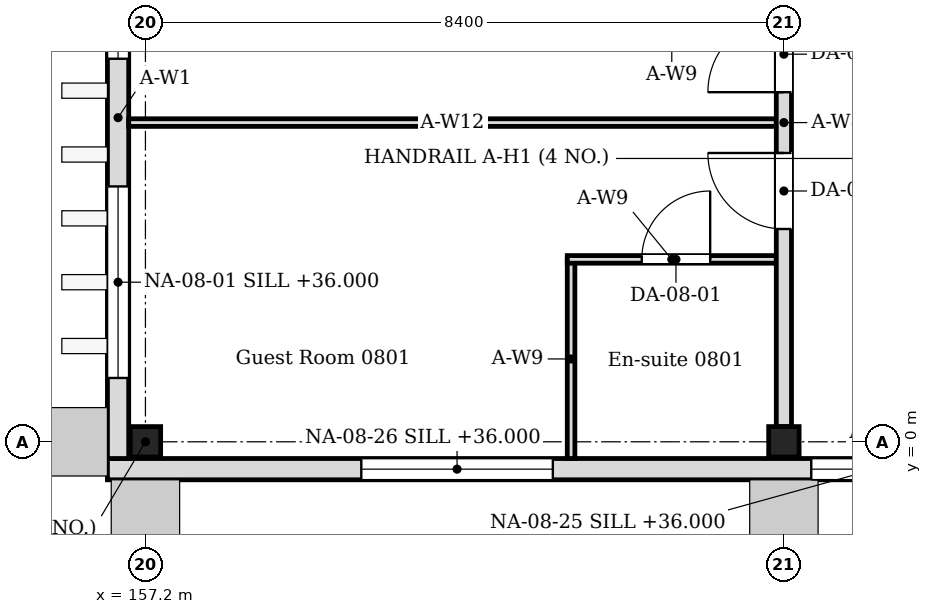
"""IFC4 building model, lengths in metres.
Left out: names, types, materials, properties, quantities, classifications, styles, units other than length and angle.
Written with IfcOpenShell. Run it as: python <this file> out.ifc"""

import sys

from ifc_helpers import new_model, si_unit, direction, frame, frame_2d, origin, origin_2d, place, context, subcontext, project, spatial, rectangle, i_section, extrude, element, fill, save


model = new_model("IFC4")
c1 = context("Model", 3, precision=1e-05, world=origin(), true_north=direction((0.0, 1.0)))
c2 = subcontext(c1, "Body", "Model", "MODEL_VIEW")
j1 = project(units=[si_unit("LENGTHUNIT", "METRE"), si_unit("PLANEANGLEUNIT", "RADIAN")], contexts=[c1])
p1 = place(None, origin())
s1 = spatial("IfcSite", under=j1, at=p1, CompositionType="ELEMENT")
p2 = place(p1, origin())
s2 = spatial("IfcBuilding", under=s1, at=p2, CompositionType="ELEMENT")
p3 = place(p2, frame((0.0, 0.0, 35.4)))
s3 = spatial("IfcBuildingStorey", under=s2, at=p3, CompositionType="ELEMENT", Elevation=35.4)
for number, where, z_axis, x_axis in (
    (1, (157.2, 0.0, 0.0), (0.0, 0.0, 1.0), (1.0, 0.0, 0.0)),
    (2, (165.6, 0.0, 0.0), (0.0, 0.0, 1.0), (1.0, 0.0, 0.0)),
):
    element("IfcColumn", number, at=place(p3, frame(where, z_axis=z_axis, x_axis=x_axis)), inside=s3, PredefinedType="COLUMN", context=c2, shape_type="SweptSolid", body=[
        extrude(i_section(OverallWidth=0.4, OverallDepth=0.4, WebThickness=0.013, FlangeThickness=0.021, FilletRadius=0.022, at=origin_2d()), origin(), (0.0, 0.0, 1.0), 4.2),
    ])
p4 = place(p3, frame((156.84, -0.22, 0.0), z_axis=(0.0, 0.0, 1.0), x_axis=(0.0, 1.0, 0.0)))
e3 = element("IfcWall", 3, at=p4, inside=s3, PredefinedType="SOLIDWALL", context=c2, shape_type="SweptSolid", body=[
    extrude(rectangle(XDim=8.97, YDim=0.28, at=frame_2d((4.485, 0.0))), origin(), (0.0, 0.0, 1.0), 4.05),
])
p5 = place(p4, frame((1.06, 0.0, 0.6)))
e4 = element("IfcOpeningElement", 4, at=p5, cuts=e3, PredefinedType="OPENING", context=c2, shape_type="SweptSolid", body=[
    extrude(rectangle(XDim=2.52, YDim=2.4, at=frame_2d((1.26, 1.2))), frame((0.0, 0.15, 0.0), z_axis=(0.0, -1.0, 0.0), x_axis=(1.0, 0.0, 0.0)), (0.0, 0.0, 1.0), 0.3),
])
p6 = place(p4, frame((5.26, 0.0, 0.6)))
e5 = element("IfcOpeningElement", 5, at=p6, cuts=e3, PredefinedType="OPENING", context=c2, shape_type="SweptSolid", body=[
    extrude(rectangle(XDim=2.52, YDim=2.4, at=frame_2d((1.26, 1.2))), frame((0.0, 0.15, 0.0), z_axis=(0.0, -1.0, 0.0), x_axis=(1.0, 0.0, 0.0)), (0.0, 0.0, 1.0), 0.3),
])
p7 = place(p3, frame((156.7, -0.36, 0.0), z_axis=(0.0, 0.0, 1.0), x_axis=(1.0, 0.0, 0.0)))
e6 = element("IfcWall", 6, at=p7, inside=s3, PredefinedType="SOLIDWALL", context=c2, shape_type="SweptSolid", body=[
    extrude(rectangle(XDim=20.2, YDim=0.28, at=frame_2d((10.1, 0.0))), origin(), (0.0, 0.0, 1.0), 4.05),
])
p8 = place(p7, frame((9.26, 0.0, 0.6)))
e7 = element("IfcOpeningElement", 7, at=p8, cuts=e6, PredefinedType="OPENING", context=c2, shape_type="SweptSolid", body=[
    extrude(rectangle(XDim=1.68, YDim=2.4, at=frame_2d((0.84, 1.2))), frame((0.0, 0.15, 0.0), z_axis=(0.0, -1.0, 0.0), x_axis=(1.0, 0.0, 0.0)), (0.0, 0.0, 1.0), 0.3),
])
p9 = place(p7, frame((3.34, 0.0, 0.6)))
e8 = element("IfcOpeningElement", 8, at=p9, cuts=e6, PredefinedType="OPENING", context=c2, shape_type="SweptSolid", body=[
    extrude(rectangle(XDim=2.52, YDim=2.4, at=frame_2d((1.26, 1.2))), frame((0.0, 0.15, 0.0), z_axis=(0.0, -1.0, 0.0), x_axis=(1.0, 0.0, 0.0)), (0.0, 0.0, 1.0), 0.3),
])
p10 = place(p3, frame((162.8, -0.22, 0.0), z_axis=(0.0, 0.0, 1.0), x_axis=(0.0, 1.0, 0.0)))
e9 = element("IfcWall", 9, at=p10, inside=s3, PredefinedType="PARTITIONING", context=c2, shape_type="SweptSolid", body=[
    extrude(rectangle(XDim=2.62, YDim=0.1, at=frame_2d((1.31, 0.0))), origin(), (0.0, 0.0, 1.0), 4.05),
])
p11 = place(p3, frame((162.75, 2.4, 0.0), z_axis=(0.0, 0.0, 1.0), x_axis=(1.0, 0.0, 0.0)))
e10 = element("IfcWall", 10, at=p11, inside=s3, PredefinedType="PARTITIONING", context=c2, shape_type="SweptSolid", body=[
    extrude(rectangle(XDim=2.75, YDim=0.1, at=frame_2d((1.375, 0.0))), origin(), (0.0, 0.0, 1.0), 4.05),
])
p12 = place(p11, frame((0.98, 0.0, 0.0)))
e11 = element("IfcOpeningElement", 11, at=p12, cuts=e10, PredefinedType="OPENING", context=c2, shape_type="SweptSolid", body=[
    extrude(rectangle(XDim=0.9, YDim=2.1, at=frame_2d((0.45, 1.05))), frame((0.0, 0.06, 0.0), z_axis=(0.0, -1.0, 0.0), x_axis=(1.0, 0.0, 0.0)), (0.0, 0.0, 1.0), 0.12),
])
p13 = place(p3, frame((156.98, 4.2, 0.0), z_axis=(0.0, 0.0, 1.0), x_axis=(1.0, 0.0, 0.0)))
e12 = element("IfcWall", 12, at=p13, inside=s3, PredefinedType="PARTITIONING", context=c2, shape_type="SweptSolid", body=[
    extrude(rectangle(XDim=8.52, YDim=0.1, at=frame_2d((4.26, 0.0))), origin(), (0.0, 0.0, 1.0), 3.604),
])
p14 = place(p3, frame((165.6, 0.2, 0.0), z_axis=(0.0, 0.0, 1.0), x_axis=(0.0, 1.0, 0.0)))
e13 = element("IfcWall", 13, at=p14, inside=s3, PredefinedType="PARTITIONING", context=c2, shape_type="SweptSolid", body=[
    extrude(rectangle(XDim=8.0, YDim=0.2, at=frame_2d((4.0, 0.0))), origin(), (0.0, 0.0, 1.0), 3.45),
])
p15 = place(p14, frame((2.6, 0.0, 0.0)))
e14 = element("IfcOpeningElement", 14, at=p15, cuts=e13, PredefinedType="OPENING", context=c2, shape_type="SweptSolid", body=[
    extrude(rectangle(XDim=1.0, YDim=2.4, at=frame_2d((0.5, 1.2))), frame((0.0, 0.11, 0.0), z_axis=(0.0, -1.0, 0.0), x_axis=(1.0, 0.0, 0.0)), (0.0, 0.0, 1.0), 0.22),
])
p16 = place(p14, frame((4.4, 0.0, 0.0)))
e15 = element("IfcOpeningElement", 15, at=p16, cuts=e13, PredefinedType="OPENING", context=c2, shape_type="SweptSolid", body=[
    extrude(rectangle(XDim=1.0, YDim=2.4, at=frame_2d((0.5, 1.2))), frame((0.0, 0.11, 0.0), z_axis=(0.0, -1.0, 0.0), x_axis=(1.0, 0.0, 0.0)), (0.0, 0.0, 1.0), 0.22),
])
p17 = place(p5, origin())
e16 = element("IfcWindow", 16, at=p17, inside=s3, PartitioningType="SINGLE_PANEL", PredefinedType="WINDOW", context=c2, shape_type="SweptSolid", body=[
    extrude(rectangle(XDim=2.52, YDim=2.4, at=frame_2d((1.26, 1.2))), frame((0.0, 0.03, 0.0), z_axis=(0.0, -1.0, 0.0), x_axis=(1.0, 0.0, 0.0)), (0.0, 0.0, 1.0), 0.06),
])
fill(e4, e16)
p18 = place(p6, origin())
e17 = element("IfcWindow", 17, at=p18, inside=s3, PartitioningType="SINGLE_PANEL", PredefinedType="WINDOW", context=c2, shape_type="SweptSolid", body=[
    extrude(rectangle(XDim=2.52, YDim=2.4, at=frame_2d((1.26, 1.2))), frame((0.0, 0.03, 0.0), z_axis=(0.0, -1.0, 0.0), x_axis=(1.0, 0.0, 0.0)), (0.0, 0.0, 1.0), 0.06),
])
fill(e5, e17)
p19 = place(p8, origin())
e18 = element("IfcWindow", 18, at=p19, inside=s3, PartitioningType="SINGLE_PANEL", PredefinedType="WINDOW", context=c2, shape_type="SweptSolid", body=[
    extrude(rectangle(XDim=1.68, YDim=2.4, at=frame_2d((0.84, 1.2))), frame((0.0, 0.03, 0.0), z_axis=(0.0, -1.0, 0.0), x_axis=(1.0, 0.0, 0.0)), (0.0, 0.0, 1.0), 0.06),
])
fill(e7, e18)
p20 = place(p9, origin())
e19 = element("IfcWindow", 19, at=p20, inside=s3, PartitioningType="SINGLE_PANEL", PredefinedType="WINDOW", context=c2, shape_type="SweptSolid", body=[
    extrude(rectangle(XDim=2.52, YDim=2.4, at=frame_2d((1.26, 1.2))), frame((0.0, 0.03, 0.0), z_axis=(0.0, -1.0, 0.0), x_axis=(1.0, 0.0, 0.0)), (0.0, 0.0, 1.0), 0.06),
])
fill(e8, e19)
p21 = place(p12, origin())
e20 = element("IfcDoor", 20, at=p21, inside=s3, OperationType="SINGLE_SWING_RIGHT", PredefinedType="DOOR", context=c2, shape_type="SweptSolid", body=[
    extrude(rectangle(XDim=0.9, YDim=2.1, at=frame_2d((0.45, 1.05))), frame((0.0, 0.025, 0.0), z_axis=(0.0, -1.0, 0.0), x_axis=(1.0, 0.0, 0.0)), (0.0, 0.0, 1.0), 0.05),
])
fill(e11, e20)
p22 = place(p15, origin())
e21 = element("IfcDoor", 21, at=p22, inside=s3, OperationType="SINGLE_SWING_RIGHT", PredefinedType="DOOR", context=c2, shape_type="SweptSolid", body=[
    extrude(rectangle(XDim=1.0, YDim=2.4, at=frame_2d((0.5, 1.2))), frame((0.0, 0.025, 0.0), z_axis=(0.0, -1.0, 0.0), x_axis=(1.0, 0.0, 0.0)), (0.0, 0.0, 1.0), 0.05),
])
fill(e14, e21)
p23 = place(p16, origin())
e22 = element("IfcDoor", 22, at=p23, inside=s3, OperationType="SINGLE_SWING_LEFT", PredefinedType="DOOR", context=c2, shape_type="SweptSolid", body=[
    extrude(rectangle(XDim=1.0, YDim=2.4, at=frame_2d((0.5, 1.2))), frame((0.0, 0.025, 0.0), z_axis=(0.0, -1.0, 0.0), x_axis=(1.0, 0.0, 0.0)), (0.0, 0.0, 1.0), 0.05),
])
fill(e15, e22)
save(model, sys.argv[1])
